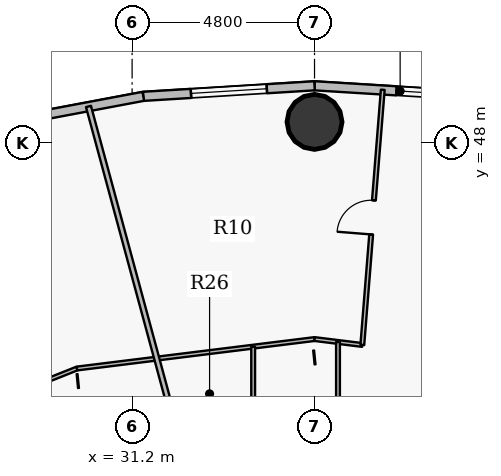
"""IFC4 building model, lengths in metres.
Left out: names, types, materials, properties, quantities, classifications, styles, units other than length and angle.
Written with IfcOpenShell. Run it as: python <this file> out.ifc"""

import sys

from ifc_helpers import new_model, si_unit, direction, frame, frame_2d, origin, origin_2d, place, context, subcontext, project, spatial, rectangle, hollow_circle, extrude, source, transform, mapped, element, fill, save


model = new_model("IFC4")
c1 = context("Model", 3, precision=1e-05, world=origin(), true_north=direction((0.0, 1.0)))
c2 = subcontext(c1, "Body", "Model", "MODEL_VIEW")
j1 = project(units=[si_unit("LENGTHUNIT", "METRE"), si_unit("PLANEANGLEUNIT", "RADIAN")], contexts=[c1])
p1 = place(None, origin())
s1 = spatial("IfcSite", under=j1, at=p1, CompositionType="ELEMENT")
p2 = place(p1, origin())
s2 = spatial("IfcBuilding", under=s1, at=p2, CompositionType="ELEMENT")
p3 = place(p2, frame((0.0, 0.0, 134.7)))
s3 = spatial("IfcBuildingStorey", under=s2, at=p3, CompositionType="ELEMENT", Elevation=134.7)
p4 = place(p3, frame((36.0, 48.555, 0.0), z_axis=(0.0, 0.0, 1.0), x_axis=(1.0, 0.0, 0.0)))
e1 = element("IfcColumn", 1, at=p4, inside=s3, PredefinedType="COLUMN", context=c2, shape_type="SweptSolid", body=[
    extrude(hollow_circle(Radius=0.725, WallThickness=0.042, at=origin_2d()), origin(), (0.0, 0.0, 1.0), 3.75),
])
p5 = place(p3, frame((36.0, 49.505, 0.0), z_axis=(0.0, 0.0, 1.0), x_axis=(0.998107531589, -0.061492726276, 0.0)))
e2 = element("IfcWall", 2, at=p5, inside=s3, PredefinedType="SOLIDWALL", context=c2, shape_type="SweptSolid", body=[
    extrude(rectangle(XDim=4.514, YDim=0.24, at=frame_2d((2.257, 0.0))), origin(), (0.0, 0.0, 1.0), 3.5),
])
p6 = place(p5, frame((2.161, 0.0, 0.9)))
e3 = element("IfcOpeningElement", 3, at=p6, cuts=e2, PredefinedType="OPENING", context=c2, shape_type="SweptSolid", body=[
    extrude(rectangle(XDim=1.6, YDim=1.75, at=origin_2d()), frame((0.8, 0.13, 0.875), z_axis=(0.0, -1.0, 0.0), x_axis=(1.0, 0.0, 0.0)), (0.0, 0.0, 1.0), 0.26),
])
p7 = place(p3, frame((31.494, 49.227, 0.0), z_axis=(0.0, 0.0, 1.0), x_axis=(0.998107531589, 0.061492726276, 0.0)))
e4 = element("IfcWall", 4, at=p7, inside=s3, PredefinedType="SOLIDWALL", context=c2, shape_type="SweptSolid", body=[
    extrude(rectangle(XDim=4.514, YDim=0.24, at=frame_2d((2.257, 0.0))), origin(), (0.0, 0.0, 1.0), 3.5),
])
p8 = place(p7, frame((1.257, 0.0, 0.9)))
e5 = element("IfcOpeningElement", 5, at=p8, cuts=e4, PredefinedType="OPENING", context=c2, shape_type="SweptSolid", body=[
    extrude(rectangle(XDim=2.0, YDim=1.75, at=origin_2d()), frame((1.0, 0.13, 0.875), z_axis=(0.0, -1.0, 0.0), x_axis=(1.0, 0.0, 0.0)), (0.0, 0.0, 1.0), 0.26),
])
p9 = place(p3, frame((27.1, 48.401, 0.0), z_axis=(0.0, 0.0, 1.0), x_axis=(0.982789252177, 0.184730305596, 0.0)))
e6 = element("IfcWall", 6, at=p9, inside=s3, PredefinedType="SOLIDWALL", context=c2, shape_type="SweptSolid", body=[
    extrude(rectangle(XDim=4.471, YDim=0.24, at=frame_2d((2.235, 0.0))), origin(), (0.0, 0.0, 1.0), 3.5),
])
p10 = place(p3, frame((25.519, 40.378, 0.0), z_axis=(0.0, 0.0, 1.0), x_axis=(0.928790623107, 0.37060488182, 0.0)))
e7 = element("IfcWall", 7, at=p10, inside=s3, PredefinedType="PARTITIONING", context=c2, shape_type="SweptSolid", body=[
    extrude(rectangle(XDim=4.554, YDim=0.1, at=frame_2d((2.277, 0.0))), origin(), (0.0, 0.0, 1.0), 2.935),
])
p11 = place(p3, frame((29.749, 42.066, 0.0), z_axis=(0.0, 0.0, 1.0), x_axis=(0.992395485088, 0.123090215599, 0.0)))
e8 = element("IfcWall", 8, at=p11, inside=s3, PredefinedType="PARTITIONING", context=c2, shape_type="SweptSolid", body=[
    extrude(rectangle(XDim=6.299, YDim=0.1, at=frame_2d((3.15, 0.0))), origin(), (0.0, 0.0, 1.0), 2.935),
])
p12 = place(p3, frame((30.052, 48.961, 0.0), z_axis=(0.0, 0.0, 1.0), x_axis=(0.261432565902, -0.965221743169, 0.0)))
e9 = element("IfcWall", 9, at=p12, inside=s3, PredefinedType="PARTITIONING", context=c2, shape_type="SweptSolid", body=[
    extrude(rectangle(XDim=12.755, YDim=0.135, at=frame_2d((6.377, 0.0))), origin(), (0.0, 0.0, 1.0), 2.935),
])
p13 = place(p3, frame((34.385, 36.757, 0.0), z_axis=(0.0, 0.0, 1.0), x_axis=(0.0, 1.0, 0.0)))
e10 = element("IfcWall", 10, at=p13, inside=s3, PredefinedType="PARTITIONING", context=c2, shape_type="SweptSolid", body=[
    extrude(rectangle(XDim=5.884, YDim=0.1, at=frame_2d((2.942, 0.0))), origin(), (0.0, 0.0, 1.0), 3.185),
])
p14 = place(p13, frame((2.532, 0.0, 0.0)))
e11 = element("IfcOpeningElement", 11, at=p14, cuts=e10, PredefinedType="OPENING", context=c2, shape_type="SweptSolid", body=[
    extrude(rectangle(XDim=0.82, YDim=2.1, at=origin_2d()), frame((0.41, 0.06, 1.05), z_axis=(0.0, -1.0, 0.0), x_axis=(1.0, 0.0, 0.0)), (0.0, 0.0, 1.0), 0.12),
])
p15 = place(p3, frame((36.0, 42.841, 0.0), z_axis=(0.0, 0.0, 1.0), x_axis=(0.992384274499, -0.123180565541, 0.0)))
e12 = element("IfcWall", 12, at=p15, inside=s3, PredefinedType="PARTITIONING", context=c2, shape_type="SweptSolid", body=[
    extrude(rectangle(XDim=1.267, YDim=0.1, at=frame_2d((0.633, 0.0))), origin(), (0.0, 0.0, 1.0), 2.935),
])
p16 = place(p3, frame((36.617, 36.881, 0.0), z_axis=(0.0, 0.0, 1.0), x_axis=(0.0, 1.0, 0.0)))
e13 = element("IfcWall", 13, at=p16, inside=s3, PredefinedType="PARTITIONING", context=c2, shape_type="SweptSolid", body=[
    extrude(rectangle(XDim=5.884, YDim=0.1, at=frame_2d((2.942, 0.0))), origin(), (0.0, 0.0, 1.0), 3.5),
])
p17 = place(p16, frame((2.492, 0.0, 0.0)))
e14 = element("IfcOpeningElement", 14, at=p17, cuts=e13, PredefinedType="OPENING", context=c2, shape_type="SweptSolid", body=[
    extrude(rectangle(XDim=0.9, YDim=2.1, at=origin_2d()), frame((0.45, 0.06, 1.05), z_axis=(0.0, -1.0, 0.0), x_axis=(1.0, 0.0, 0.0)), (0.0, 0.0, 1.0), 0.12),
])
p18 = place(p3, frame((37.258, 42.685, 0.0), z_axis=(0.0, 0.0, 1.0), x_axis=(0.079919529762, 0.9968013186, 0.0)))
e15 = element("IfcWall", 15, at=p18, inside=s3, PredefinedType="PARTITIONING", context=c2, shape_type="SweptSolid", body=[
    extrude(rectangle(XDim=6.736, YDim=0.1, at=frame_2d((3.368, 0.0))), origin(), (0.0, 0.0, 1.0), 2.935),
])
p19 = place(p18, frame((2.918, 0.0, 0.0)))
e16 = element("IfcOpeningElement", 16, at=p19, cuts=e15, PredefinedType="OPENING", context=c2, shape_type="SweptSolid", body=[
    extrude(rectangle(XDim=0.9, YDim=2.1, at=origin_2d()), frame((0.45, 0.06, 1.05), z_axis=(0.0, -1.0, 0.0), x_axis=(1.0, 0.0, 0.0)), (0.0, 0.0, 1.0), 0.12),
])
m1 = source(origin(), c2, "Body", "SweptSolid", [
    extrude(rectangle(XDim=1.6, YDim=1.75, at=origin_2d()), frame((0.8, 0.03, 0.875), z_axis=(0.0, -1.0, 0.0), x_axis=(1.0, 0.0, 0.0)), (0.0, 0.0, 1.0), 0.06),
])
p20 = place(p6, origin())
e17 = element("IfcWindow", 17, at=p20, inside=s3, PartitioningType="DOUBLE_PANEL_VERTICAL", PredefinedType="WINDOW", context=c2, shape_type="MappedRepresentation", body=[
    mapped(m1, transform((0.0, 0.0, 0.0), x_axis=(1.0, 0.0, 0.0), y_axis=(0.0, 1.0, 0.0), z_axis=(0.0, 0.0, 1.0), scale=1.0)),
])
fill(e3, e17)
m2 = source(origin(), c2, "Body", "SweptSolid", [
    extrude(rectangle(XDim=2.0, YDim=1.75, at=origin_2d()), frame((1.0, 0.03, 0.875), z_axis=(0.0, -1.0, 0.0), x_axis=(1.0, 0.0, 0.0)), (0.0, 0.0, 1.0), 0.06),
])
p21 = place(p8, origin())
e18 = element("IfcWindow", 18, at=p21, inside=s3, PartitioningType="DOUBLE_PANEL_VERTICAL", PredefinedType="WINDOW", context=c2, shape_type="MappedRepresentation", body=[
    mapped(m2, transform((0.0, 0.0, 0.0), x_axis=(1.0, 0.0, 0.0), y_axis=(0.0, 1.0, 0.0), z_axis=(0.0, 0.0, 1.0), scale=1.0)),
])
fill(e5, e18)
m3 = source(origin(), c2, "Body", "SweptSolid", [
    extrude(rectangle(XDim=0.9, YDim=2.1, at=origin_2d()), frame((0.45, 0.025, 1.05), z_axis=(0.0, -1.0, 0.0), x_axis=(1.0, 0.0, 0.0)), (0.0, 0.0, 1.0), 0.05),
])
p22 = place(p19, origin())
e19 = element("IfcDoor", 19, at=p22, inside=s3, OperationType="SINGLE_SWING_LEFT", PredefinedType="DOOR", context=c2, shape_type="MappedRepresentation", body=[
    mapped(m3, transform((0.0, 0.0, 0.0), x_axis=(1.0, 0.0, 0.0), y_axis=(0.0, 1.0, 0.0), z_axis=(0.0, 0.0, 1.0), scale=1.0)),
])
fill(e16, e19)
save(model, sys.argv[1])
